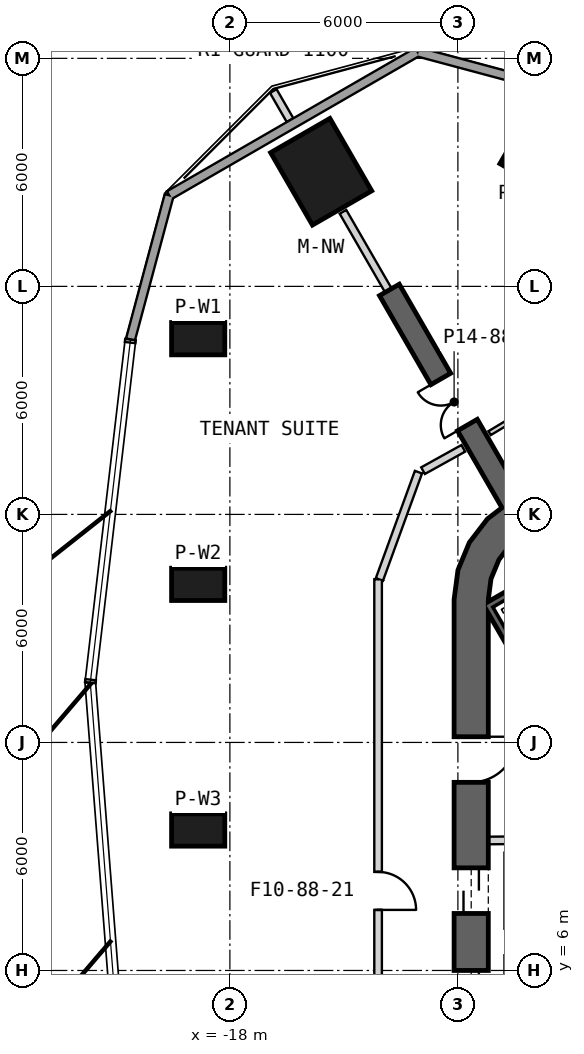
"""IFC4 building model, lengths in metres.
Left out: names, types, materials, properties, quantities, classifications, styles, units other than length and angle.
Written with IfcOpenShell. Run it as: python <this file> out.ifc"""

import sys

from ifc_helpers import new_model, si_unit, direction, frame, frame_2d, origin, origin_2d, place, context, subcontext, project, spatial, polyline, rectangle, outline, extrude, element, fill, save


model = new_model("IFC4")
c1 = context("Model", 3, precision=1e-05, world=origin(), true_north=direction((0.0, 1.0)))
c2 = subcontext(c1, "Body", "Model", "MODEL_VIEW")
j1 = project(units=[si_unit("LENGTHUNIT", "METRE"), si_unit("PLANEANGLEUNIT", "RADIAN")], contexts=[c1])
p1 = place(None, origin())
s1 = spatial("IfcSite", under=j1, at=p1, CompositionType="ELEMENT")
p2 = place(p1, origin())
s2 = spatial("IfcBuilding", under=s1, at=p2, CompositionType="ELEMENT")
p3 = place(p2, frame((0.0, 0.0, 380.6)))
s3 = spatial("IfcBuildingStorey", under=s2, at=p3, CompositionType="ELEMENT", Elevation=380.6)
p4 = place(p3, frame((-15.598, 27.016, 0.0), z_axis=(0.0, 0.0, 1.0), x_axis=(-0.5, 0.866025403784, 0.0)))
e1 = element("IfcColumn", 1, at=p4, inside=s3, PredefinedType="COLUMN", context=c2, shape_type="SweptSolid", body=[
    extrude(rectangle(XDim=2.2, YDim=1.8, at=origin_2d()), origin(), (0.0, 0.0, 1.0), 3.9),
])
for number, where, z_axis, x_axis in (
    (2, (-18.834, 22.624, 0.0), (0.0, 0.0, 1.0), (-1.0, 0.0, 0.0)),
    (3, (-18.834, 16.16, 0.0), (0.0, 0.0, 1.0), (-1.0, 0.0, 0.0)),
    (4, (-18.834, 9.696, 0.0), (0.0, 0.0, 1.0), (-1.0, 0.0, 0.0)),
    (5, (-10.176, 27.623, 0.0), (0.0, 0.0, 1.0), (0.5, 0.866, 0.0)),
):
    element("IfcColumn", number, at=place(p3, frame(where, z_axis=z_axis, x_axis=x_axis)), inside=s3, PredefinedType="COLUMN", context=c2, shape_type="SweptSolid", body=[
        extrude(rectangle(XDim=1.4, YDim=0.85, at=origin_2d()), origin(), (0.0, 0.0, 1.0), 3.9),
    ])
p5 = place(p3, frame((-11.65, 15.762, 0.0), z_axis=(0.0, 0.0, 1.0), x_axis=(0.0, -1.0, 0.0)))
e6 = element("IfcWall", 6, at=p5, inside=s3, PredefinedType="SHEAR", context=c2, shape_type="SweptSolid", body=[
    extrude(rectangle(XDim=31.523, YDim=0.9, at=frame_2d((15.762, 0.0))), origin(), (0.0, 0.0, 1.0), 3.9),
])
p6 = place(p5, frame((7.062, 0.0, 0.0)))
e7 = element("IfcOpeningElement", 7, at=p6, cuts=e6, PredefinedType="OPENING", context=c2, shape_type="SweptSolid", body=[
    extrude(rectangle(XDim=1.2, YDim=2.4, at=frame_2d((0.6, 1.2))), frame((0.0, 0.46, 0.0), z_axis=(0.0, -1.0, 0.0), x_axis=(1.0, 0.0, 0.0)), (0.0, 0.0, 1.0), 0.92),
])
p7 = place(p5, frame((9.762, 0.0, 0.0)))
e8 = element("IfcOpeningElement", 8, at=p7, cuts=e6, PredefinedType="OPENING", context=c2, shape_type="SweptSolid", body=[
    extrude(rectangle(XDim=1.2, YDim=2.4, at=frame_2d((0.6, 1.2))), frame((0.0, 0.46, 0.0), z_axis=(0.0, -1.0, 0.0), x_axis=(1.0, 0.0, 0.0)), (0.0, 0.0, 1.0), 0.92),
])
p8 = place(p5, frame((12.462, 0.0, 0.0)))
e9 = element("IfcOpeningElement", 9, at=p8, cuts=e6, PredefinedType="OPENING", context=c2, shape_type="SweptSolid", body=[
    extrude(rectangle(XDim=1.2, YDim=2.4, at=frame_2d((0.6, 1.2))), frame((0.0, 0.46, 0.0), z_axis=(0.0, -1.0, 0.0), x_axis=(1.0, 0.0, 0.0)), (0.0, 0.0, 1.0), 0.92),
])
p9 = place(p5, frame((15.162, 0.0, 0.0)))
e10 = element("IfcOpeningElement", 10, at=p9, cuts=e6, PredefinedType="OPENING", context=c2, shape_type="SweptSolid", body=[
    extrude(rectangle(XDim=1.2, YDim=2.4, at=frame_2d((0.6, 1.2))), frame((0.0, 0.46, 0.0), z_axis=(0.0, -1.0, 0.0), x_axis=(1.0, 0.0, 0.0)), (0.0, 0.0, 1.0), 0.92),
])
p10 = place(p5, frame((17.862, 0.0, 0.0)))
e11 = element("IfcOpeningElement", 11, at=p10, cuts=e6, PredefinedType="OPENING", context=c2, shape_type="SweptSolid", body=[
    extrude(rectangle(XDim=1.2, YDim=2.4, at=frame_2d((0.6, 1.2))), frame((0.0, 0.46, 0.0), z_axis=(0.0, -1.0, 0.0), x_axis=(1.0, 0.0, 0.0)), (0.0, 0.0, 1.0), 0.92),
])
p11 = place(p5, frame((20.562, 0.0, 0.0)))
e12 = element("IfcOpeningElement", 12, at=p11, cuts=e6, PredefinedType="OPENING", context=c2, shape_type="SweptSolid", body=[
    extrude(rectangle(XDim=1.2, YDim=2.4, at=frame_2d((0.6, 1.2))), frame((0.0, 0.46, 0.0), z_axis=(0.0, -1.0, 0.0), x_axis=(1.0, 0.0, 0.0)), (0.0, 0.0, 1.0), 0.92),
])
p12 = place(p5, frame((23.262, 0.0, 0.0)))
e13 = element("IfcOpeningElement", 13, at=p12, cuts=e6, PredefinedType="OPENING", context=c2, shape_type="SweptSolid", body=[
    extrude(rectangle(XDim=1.2, YDim=2.4, at=frame_2d((0.6, 1.2))), frame((0.0, 0.46, 0.0), z_axis=(0.0, -1.0, 0.0), x_axis=(1.0, 0.0, 0.0)), (0.0, 0.0, 1.0), 0.92),
])
p13 = place(p5, frame((3.612, 0.0, 0.0)))
e14 = element("IfcOpeningElement", 14, at=p13, cuts=e6, PredefinedType="OPENING", context=c2, shape_type="SweptSolid", body=[
    extrude(rectangle(XDim=1.2, YDim=2.4, at=frame_2d((0.6, 1.2))), frame((0.0, 0.46, 0.0), z_axis=(0.0, -1.0, 0.0), x_axis=(1.0, 0.0, 0.0)), (0.0, 0.0, 1.0), 0.92),
])
p14 = place(p5, frame((26.712, 0.0, 0.0)))
e15 = element("IfcOpeningElement", 15, at=p14, cuts=e6, PredefinedType="OPENING", context=c2, shape_type="SweptSolid", body=[
    extrude(rectangle(XDim=1.2, YDim=2.4, at=frame_2d((0.6, 1.2))), frame((0.0, 0.46, 0.0), z_axis=(0.0, -1.0, 0.0), x_axis=(1.0, 0.0, 0.0)), (0.0, 0.0, 1.0), 0.92),
])
p15 = place(p3, origin())
e16 = element("IfcWall", 16, at=p15, inside=s3, PredefinedType="SHEAR", context=c2, shape_type="SweptSolid", body=[
    extrude(outline(polyline([(-7.6, 18.36), (-8.323, 18.659), (-9.1, 18.762), (-9.876, 18.659), (-10.6, 18.36), (-11.221, 17.883), (-11.698, 17.262), (-11.998, 16.538), (-12.1, 15.762), (-11.2, 15.762), (-11.128, 16.305), (-10.919, 16.812), (-10.585, 17.247), (-10.15, 17.58), (-9.644, 17.79), (-9.1, 17.862), (-8.556, 17.79), (-8.05, 17.58), (-7.6, 18.36)])), origin(), (0.0, 0.0, 1.0), 3.9),
])
p16 = place(p3, frame((-10.575, 18.316, 0.0), z_axis=(0.0, 0.0, 1.0), x_axis=(-0.500011655475, 0.866018674388, 0.0)))
e17 = element("IfcWall", 17, at=p16, inside=s3, PredefinedType="SHEAR", context=c2, shape_type="SweptSolid", body=[
    extrude(rectangle(XDim=6.455, YDim=0.6, at=frame_2d((3.228, 0.0))), origin(), (0.0, 0.0, 1.0), 3.9),
])
p17 = place(p16, frame((2.05, 0.0, 0.0)))
e18 = element("IfcOpeningElement", 18, at=p17, cuts=e17, PredefinedType="OPENING", context=c2, shape_type="SweptSolid", body=[
    extrude(rectangle(XDim=1.4, YDim=2.4, at=frame_2d((0.7, 1.2))), frame((0.0, 0.31, 0.0), z_axis=(0.0, -1.0, 0.0), x_axis=(1.0, 0.0, 0.0)), (0.0, 0.0, 1.0), 0.62),
])
p18 = place(p3, frame((-9.279, 29.158, 0.0), z_axis=(0.0, 0.0, 1.0), x_axis=(-0.965923842933, 0.258826446974, 0.0)))
e19 = element("IfcWall", 19, at=p18, inside=s3, PredefinedType="SOLIDWALL", context=c2, shape_type="SweptSolid", body=[
    extrude(rectangle(XDim=3.917, YDim=0.24, at=frame_2d((1.958, 0.0))), origin(), (0.0, 0.0, 1.0), 3.6),
])
p19 = place(p3, frame((-13.062, 30.172, 0.0), z_axis=(0.0, 0.0, 1.0), x_axis=(-0.86602506914, -0.500000579621, 0.0)))
e20 = element("IfcWall", 20, at=p19, inside=s3, PredefinedType="SOLIDWALL", context=c2, shape_type="SweptSolid", body=[
    extrude(rectangle(XDim=7.548, YDim=0.24, at=frame_2d((3.774, 0.0))), origin(), (0.0, 0.0, 1.0), 3.6),
])
p20 = place(p3, frame((-19.598, 26.398, 0.0), z_axis=(0.0, 0.0, 1.0), x_axis=(-0.258826121588, -0.965923930123, 0.0)))
e21 = element("IfcWall", 21, at=p20, inside=s3, PredefinedType="SOLIDWALL", context=c2, shape_type="SweptSolid", body=[
    extrude(rectangle(XDim=3.931, YDim=0.24, at=frame_2d((1.965, 0.0))), origin(), (0.0, 0.0, 1.0), 3.6),
])
p21 = place(p3, frame((-11.2, 9.42, 0.0), z_axis=(0.0, 0.0, 1.0), x_axis=(0.999957167047, 0.009255488683, 0.0)))
e22 = element("IfcWall", 22, at=p21, inside=s3, PredefinedType="PLUMBINGWALL", context=c2, shape_type="SweptSolid", body=[
    extrude(rectangle(XDim=3.35, YDim=0.2, at=frame_2d((1.675, 0.0))), origin(), (0.0, 0.0, 1.0), 3.6),
])
p22 = place(p3, frame((-11.245, 15.678, -0.3), z_axis=(0.0, 0.0, 1.0), x_axis=(0.499977274689, -0.866038523851, 0.0)))
e23 = element("IfcWall", 23, at=p22, inside=s3, PredefinedType="SHEAR", context=c2, shape_type="SweptSolid", body=[
    extrude(rectangle(XDim=8.1, YDim=0.2, at=frame_2d((4.05, 0.0))), origin(), (0.0, 0.0, 1.0), 3.9),
])
p23 = place(p3, frame((-9.645, 16.486, -0.3), z_axis=(0.0, 0.0, 1.0), x_axis=(-0.866038843867, -0.499976720371, 0.0)))
e24 = element("IfcWall", 24, at=p23, inside=s3, PredefinedType="SHEAR", context=c2, shape_type="SweptSolid", body=[
    extrude(rectangle(XDim=1.69, YDim=0.2, at=frame_2d((0.845, 0.0))), origin(), (0.0, 0.0, 1.0), 3.9),
])
p24 = place(p3, frame((-14.1, 16.294, 0.0), z_axis=(0.0, 0.0, 1.0), x_axis=(0.0, -1.0, 0.0)))
e25 = element("IfcWall", 25, at=p24, inside=s3, PredefinedType="PARTITIONING", context=c2, shape_type="SweptSolid", body=[
    extrude(rectangle(XDim=8.925, YDim=0.2, at=frame_2d((4.462, 0.0))), origin(), (0.0, 0.0, 1.0), 2.97),
])
p25 = place(p24, frame((4.1, 0.0, 0.0)))
e26 = element("IfcOpeningElement", 26, at=p25, cuts=e25, PredefinedType="OPENING", context=c2, shape_type="SweptSolid", body=[
    extrude(rectangle(XDim=1.0, YDim=2.1, at=frame_2d((0.5, 1.05))), frame((0.0, 0.11, 0.0), z_axis=(0.0, -1.0, 0.0), x_axis=(1.0, 0.0, 0.0)), (0.0, 0.0, 1.0), 0.22),
])
p26 = place(p3, frame((-14.1, 7.369, 0.0), z_axis=(0.0, 0.0, 1.0), x_axis=(0.0, -1.0, 0.0)))
e27 = element("IfcWall", 27, at=p26, inside=s3, PredefinedType="PARTITIONING", context=c2, shape_type="SweptSolid", body=[
    extrude(rectangle(XDim=13.701, YDim=0.2, at=frame_2d((6.851, 0.0))), origin(), (0.0, 0.0, 1.0), 3.07),
])
p27 = place(p26, frame((6.456, 0.0, 0.0)))
e28 = element("IfcOpeningElement", 28, at=p27, cuts=e27, PredefinedType="OPENING", context=c2, shape_type="SweptSolid", body=[
    extrude(rectangle(XDim=1.0, YDim=2.1, at=frame_2d((0.5, 1.05))), frame((0.0, 0.11, 0.0), z_axis=(0.0, -1.0, 0.0), x_axis=(1.0, 0.0, 0.0)), (0.0, 0.0, 1.0), 0.22),
])
p28 = place(p3, frame((-13.038, 19.112, 0.0), z_axis=(0.0, 0.0, 1.0), x_axis=(-0.342062629946, -0.939677155833, 0.0)))
e29 = element("IfcWall", 29, at=p28, inside=s3, PredefinedType="PARTITIONING", context=c2, shape_type="SweptSolid", body=[
    extrude(rectangle(XDim=3.006, YDim=0.2, at=frame_2d((1.503, 0.0))), origin(), (0.0, 0.0, 1.0), 2.97),
])
p29 = place(p3, frame((-11.858, 19.739, 0.0), z_axis=(0.0, 0.0, 1.0), x_axis=(-0.874375812865, -0.48524935639, 0.0)))
e30 = element("IfcWall", 30, at=p29, inside=s3, PredefinedType="PARTITIONING", context=c2, shape_type="SweptSolid", body=[
    extrude(rectangle(XDim=1.211, YDim=0.2, at=frame_2d((0.606, 0.0))), origin(), (0.0, 0.0, 1.0), 3.6),
])
p30 = place(p3, frame((-14.2, 7.337, 0.0), z_axis=(0.0, 0.0, 1.0), x_axis=(-0.996967879897, -0.077814179003, 0.0)))
e31 = element("IfcWall", 31, at=p30, inside=s3, PredefinedType="PARTITIONING", context=c2, shape_type="SweptSolid", body=[
    extrude(rectangle(XDim=6.965, YDim=0.2, at=frame_2d((3.483, 0.0))), origin(), (0.0, 0.0, 1.0), 3.07),
])
p31 = place(p25, origin())
e32 = element("IfcDoor", 32, at=p31, inside=s3, OperationType="SINGLE_SWING_RIGHT", PredefinedType="USERDEFINED", context=c2, shape_type="SweptSolid", body=[
    extrude(rectangle(XDim=1.0, YDim=2.1, at=frame_2d((0.5, 1.05))), frame((0.0, 0.025, 0.0), z_axis=(0.0, -1.0, 0.0), x_axis=(1.0, 0.0, 0.0)), (0.0, 0.0, 1.0), 0.05),
])
fill(e26, e32)
p32 = place(p6, origin())
e33 = element("IfcDoor", 33, at=p32, inside=s3, OperationType="SLIDING_TO_LEFT", PredefinedType="USERDEFINED", context=c2, shape_type="SweptSolid", body=[
    extrude(rectangle(XDim=1.2, YDim=2.4, at=frame_2d((0.6, 1.2))), frame((0.0, 0.025, 0.0), z_axis=(0.0, -1.0, 0.0), x_axis=(1.0, 0.0, 0.0)), (0.0, 0.0, 1.0), 0.05),
])
fill(e7, e33)
p33 = place(p7, origin())
e34 = element("IfcDoor", 34, at=p33, inside=s3, OperationType="SLIDING_TO_LEFT", PredefinedType="USERDEFINED", context=c2, shape_type="SweptSolid", body=[
    extrude(rectangle(XDim=1.2, YDim=2.4, at=frame_2d((0.6, 1.2))), frame((0.0, 0.025, 0.0), z_axis=(0.0, -1.0, 0.0), x_axis=(1.0, 0.0, 0.0)), (0.0, 0.0, 1.0), 0.05),
])
fill(e8, e34)
p34 = place(p13, origin())
e35 = element("IfcDoor", 35, at=p34, inside=s3, OperationType="SINGLE_SWING_RIGHT", PredefinedType="USERDEFINED", context=c2, shape_type="SweptSolid", body=[
    extrude(rectangle(XDim=1.2, YDim=2.4, at=frame_2d((0.6, 1.2))), frame((0.0, 0.025, 0.0), z_axis=(0.0, -1.0, 0.0), x_axis=(1.0, 0.0, 0.0)), (0.0, 0.0, 1.0), 0.05),
])
fill(e14, e35)
p35 = place(p17, origin())
e36 = element("IfcDoor", 36, at=p35, inside=s3, OperationType="DOUBLE_DOOR_SINGLE_SWING", PredefinedType="NOTDEFINED", context=c2, shape_type="SweptSolid", body=[
    extrude(rectangle(XDim=1.4, YDim=2.4, at=frame_2d((0.7, 1.2))), frame((0.0, 0.025, 0.0), z_axis=(0.0, -1.0, 0.0), x_axis=(1.0, 0.0, 0.0)), (0.0, 0.0, 1.0), 0.05),
])
fill(e18, e36)
save(model, sys.argv[1])
